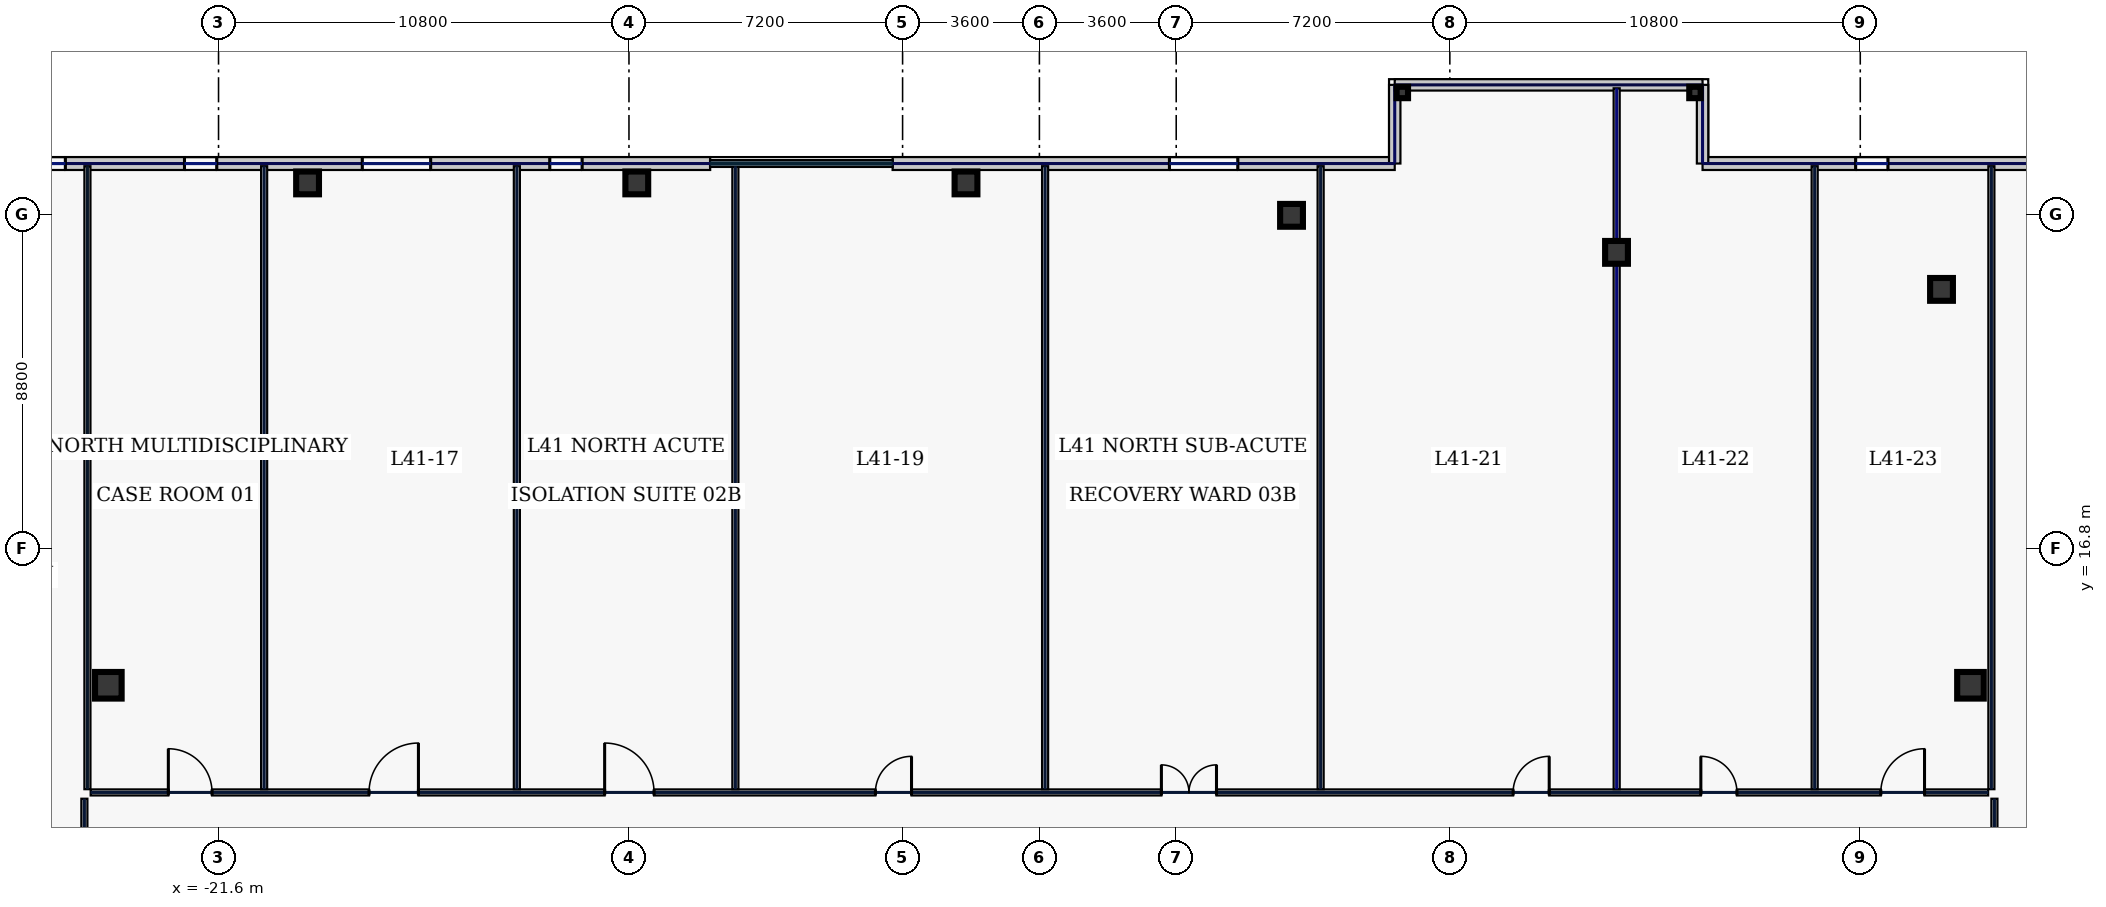
"""IFC4 building model, lengths in metres.
Left out: names, types, materials, properties, quantities, classifications, styles, units other than length and angle.
Written with IfcOpenShell. Run it as: python <this file> out.ifc"""

import sys

from ifc_helpers import new_model, si_unit, direction, frame, frame_2d, origin, origin_2d, place, context, subcontext, project, spatial, rectangle, hollow_rectangle, extrude, element, fill, save


model = new_model("IFC4")
c1 = context("Model", 3, precision=1e-05, world=origin(), true_north=direction((0.0, 1.0)))
c2 = subcontext(c1, "Body", "Model", "MODEL_VIEW")
j1 = project(units=[si_unit("LENGTHUNIT", "METRE"), si_unit("PLANEANGLEUNIT", "RADIAN")], contexts=[c1])
p1 = place(None, origin())
s1 = spatial("IfcSite", under=j1, at=p1, CompositionType="ELEMENT")
p2 = place(p1, origin())
s2 = spatial("IfcBuilding", under=s1, at=p2, CompositionType="ELEMENT")
p3 = place(p2, frame((0.0, 0.0, 180.2)))
s3 = spatial("IfcBuildingStorey", under=s2, at=p3, CompositionType="ELEMENT", Elevation=180.2)
for number, where, z_axis, x_axis in (
    (1, (-24.5, 13.2, 0.0), (0.0, 0.0, 1.0), (1.0, 0.0, 0.0)),
    (2, (24.5, 13.2, 0.0), (0.0, 0.0, 1.0), (1.0, 0.0, 0.0)),
):
    element("IfcColumn", number, at=place(p3, frame(where, z_axis=z_axis, x_axis=x_axis)), inside=s3, PredefinedType="COLUMN", context=c2, shape_type="SweptSolid", body=[
        extrude(hollow_rectangle(XDim=0.7, YDim=0.7, WallThickness=0.032, at=origin_2d()), origin(), (0.0, 0.0, 1.0), 3.74),
    ])
for number, where, z_axis, x_axis in (
    (3, (23.738, 23.618, 0.0), (0.0, 0.0, 1.0), (1.0, 0.0, 0.0)),
    (4, (15.186, 24.592, 0.0), (0.0, 0.0, 1.0), (1.0, 0.0, 0.0)),
    (5, (6.634, 25.567, 0.0), (0.0, 0.0, 1.0), (1.0, 0.0, 0.0)),
    (6, (-1.931, 26.42, 0.0), (0.0, 0.0, 1.0), (1.0, 0.0, 0.0)),
    (7, (-10.594, 26.42, 0.0), (0.0, 0.0, 1.0), (1.0, 0.0, 0.0)),
    (8, (-19.257, 26.42, 0.0), (0.0, 0.0, 1.0), (1.0, 0.0, 0.0)),
):
    element("IfcColumn", number, at=place(p3, frame(where, z_axis=z_axis, x_axis=x_axis)), inside=s3, PredefinedType="COLUMN", context=c2, shape_type="SweptSolid", body=[
        extrude(hollow_rectangle(XDim=0.6, YDim=0.6, WallThickness=0.028, at=origin_2d()), origin(), (0.0, 0.0, 1.0), 3.74),
    ])
for number, where, z_axis, x_axis in (
    (9, (9.55, 28.8, 0.0), (0.0, 0.0, 1.0), (1.0, 0.0, 0.0)),
    (10, (17.25, 28.8, 0.0), (0.0, 0.0, 1.0), (1.0, 0.0, 0.0)),
):
    element("IfcColumn", number, at=place(p3, frame(where, z_axis=z_axis, x_axis=x_axis)), inside=s3, PredefinedType="COLUMN", context=c2, shape_type="SweptSolid", body=[
        extrude(hollow_rectangle(XDim=0.3, YDim=0.3, WallThickness=0.016, at=origin_2d()), origin(), (0.0, 0.0, 1.0), 3.74),
    ])
p4 = place(p3, frame((33.4, 26.93, 0.0), z_axis=(0.0, 0.0, 1.0), x_axis=(-1.0, 0.0, 0.0)))
e11 = element("IfcWall", 11, at=p4, inside=s3, PredefinedType="STANDARD", context=c2, shape_type="SweptSolid", body=[
    extrude(rectangle(XDim=15.95, YDim=0.34, at=frame_2d((7.975, 0.0))), origin(), (0.0, 0.0, 1.0), 3.74),
])
p5 = place(p4, frame((11.071, 0.0, 0.7)))
e12 = element("IfcOpeningElement", 12, at=p5, cuts=e11, PredefinedType="OPENING", context=c2, shape_type="SweptSolid", body=[
    extrude(rectangle(XDim=0.85, YDim=1.85, at=frame_2d((0.425, 0.925))), frame((0.0, 0.18, 0.0), z_axis=(0.0, -1.0, 0.0), x_axis=(1.0, 0.0, 0.0)), (0.0, 0.0, 1.0), 0.36),
])
p6 = place(p4, frame((6.48, 0.0, 0.7)))
e13 = element("IfcOpeningElement", 13, at=p6, cuts=e11, PredefinedType="OPENING", context=c2, shape_type="SweptSolid", body=[
    extrude(rectangle(XDim=0.85, YDim=1.85, at=frame_2d((0.425, 0.925))), frame((0.0, 0.18, 0.0), z_axis=(0.0, -1.0, 0.0), x_axis=(1.0, 0.0, 0.0)), (0.0, 0.0, 1.0), 0.36),
])
p7 = place(p4, frame((2.591, 0.0, 0.7)))
e14 = element("IfcOpeningElement", 14, at=p7, cuts=e11, PredefinedType="OPENING", context=c2, shape_type="SweptSolid", body=[
    extrude(rectangle(XDim=1.8, YDim=2.2, at=frame_2d((0.9, 1.1))), frame((0.0, 0.18, 0.0), z_axis=(0.0, -1.0, 0.0), x_axis=(1.0, 0.0, 0.0)), (0.0, 0.0, 1.0), 0.36),
])
p8 = place(p3, frame((9.35, 26.93, 0.0), z_axis=(0.0, 0.0, 1.0), x_axis=(-1.0, 0.0, 0.0)))
e15 = element("IfcWall", 15, at=p8, inside=s3, PredefinedType="STANDARD", context=c2, shape_type="SweptSolid", body=[
    extrude(rectangle(XDim=13.213, YDim=0.34, at=frame_2d((6.606, 0.0))), origin(), (0.0, 0.0, 1.0), 3.74),
])
p9 = place(p8, frame((4.128, 0.0, 0.7)))
e16 = element("IfcOpeningElement", 16, at=p9, cuts=e15, PredefinedType="OPENING", context=c2, shape_type="SweptSolid", body=[
    extrude(rectangle(XDim=1.8, YDim=2.2, at=frame_2d((0.9, 1.1))), frame((0.0, 0.18, 0.0), z_axis=(0.0, -1.0, 0.0), x_axis=(1.0, 0.0, 0.0)), (0.0, 0.0, 1.0), 0.36),
])
p10 = place(p3, frame((-8.663, 26.93, 0.0), z_axis=(0.0, 0.0, 1.0), x_axis=(-1.0, 0.0, 0.0)))
e17 = element("IfcWall", 17, at=p10, inside=s3, PredefinedType="STANDARD", context=c2, shape_type="SweptSolid", body=[
    extrude(rectangle(XDim=19.937, YDim=0.34, at=frame_2d((9.969, 0.0))), origin(), (0.0, 0.0, 1.0), 3.74),
])
p11 = place(p10, frame((16.968, 0.0, 0.7)))
e18 = element("IfcOpeningElement", 18, at=p11, cuts=e17, PredefinedType="OPENING", context=c2, shape_type="SweptSolid", body=[
    extrude(rectangle(XDim=0.85, YDim=1.85, at=frame_2d((0.425, 0.925))), frame((0.0, 0.18, 0.0), z_axis=(0.0, -1.0, 0.0), x_axis=(1.0, 0.0, 0.0)), (0.0, 0.0, 1.0), 0.36),
])
p12 = place(p10, frame((12.983, 0.0, 0.7)))
e19 = element("IfcOpeningElement", 19, at=p12, cuts=e17, PredefinedType="OPENING", context=c2, shape_type="SweptSolid", body=[
    extrude(rectangle(XDim=0.85, YDim=1.85, at=frame_2d((0.425, 0.925))), frame((0.0, 0.18, 0.0), z_axis=(0.0, -1.0, 0.0), x_axis=(1.0, 0.0, 0.0)), (0.0, 0.0, 1.0), 0.36),
])
p13 = place(p10, frame((7.355, 0.0, 0.7)))
e20 = element("IfcOpeningElement", 20, at=p13, cuts=e17, PredefinedType="OPENING", context=c2, shape_type="SweptSolid", body=[
    extrude(rectangle(XDim=1.8, YDim=2.2, at=frame_2d((0.9, 1.1))), frame((0.0, 0.18, 0.0), z_axis=(0.0, -1.0, 0.0), x_axis=(1.0, 0.0, 0.0)), (0.0, 0.0, 1.0), 0.36),
])
p14 = place(p10, frame((3.371, 0.0, 0.7)))
e21 = element("IfcOpeningElement", 21, at=p14, cuts=e17, PredefinedType="OPENING", context=c2, shape_type="SweptSolid", body=[
    extrude(rectangle(XDim=0.85, YDim=1.85, at=frame_2d((0.425, 0.925))), frame((0.0, 0.18, 0.0), z_axis=(0.0, -1.0, 0.0), x_axis=(1.0, 0.0, 0.0)), (0.0, 0.0, 1.0), 0.36),
])
for number, where, z_axis, x_axis in (
    (22, (9.35, 26.93, 0.0), (0.0, 0.0, 1.0), (0.0, 1.0, 0.0)),
    (23, (17.45, 26.93, 0.0), (0.0, 0.0, 1.0), (0.0, 1.0, 0.0)),
):
    element("IfcWall", number, at=place(p3, frame(where, z_axis=z_axis, x_axis=x_axis)), inside=s3, PredefinedType="STANDARD", context=c2, shape_type="SweptSolid", body=[
        extrude(rectangle(XDim=2.07, YDim=0.3, at=frame_2d((1.035, 0.0))), origin(), (0.0, 0.0, 1.0), 1.535),
    ])
p15 = place(p3, frame((9.35, 29.0, 0.0), z_axis=(0.0, 0.0, 1.0), x_axis=(1.0, 0.0, 0.0)))
e24 = element("IfcWall", 24, at=p15, inside=s3, PredefinedType="STANDARD", context=c2, shape_type="SweptSolid", body=[
    extrude(rectangle(XDim=8.1, YDim=0.3, at=frame_2d((4.05, 0.0))), origin(), (0.0, 0.0, 1.0), 2.135),
])
p16 = place(p3, frame((-25.13, 7.235, 0.0), z_axis=(0.0, 0.0, 1.0), x_axis=(0.0, 1.0, 0.0)))
e25 = element("IfcWall", 25, at=p16, inside=s3, PredefinedType="PARTITIONING", context=c2, shape_type="SweptSolid", body=[
    extrude(rectangle(XDim=2.98, YDim=0.16, at=frame_2d((1.49, 0.0))), origin(), (0.0, 0.0, 1.0), 3.74),
])
p17 = place(p16, frame((1.1, 0.0, 0.0)))
e26 = element("IfcOpeningElement", 26, at=p17, cuts=e25, PredefinedType="OPENING", context=c2, shape_type="SweptSolid", body=[
    extrude(rectangle(XDim=0.95, YDim=2.2, at=frame_2d((0.475, 1.1))), frame((0.0, 0.09, 0.0), z_axis=(0.0, -1.0, 0.0), x_axis=(1.0, 0.0, 0.0)), (0.0, 0.0, 1.0), 0.18),
])
p18 = place(p3, frame((-24.965, 10.38, 0.0), z_axis=(0.0, 0.0, 1.0), x_axis=(1.0, 0.0, 0.0)))
e27 = element("IfcWall", 27, at=p18, inside=s3, PredefinedType="PARTITIONING", context=c2, shape_type="SweptSolid", body=[
    extrude(rectangle(XDim=49.93, YDim=0.16, at=frame_2d((24.965, 0.0))), origin(), (0.0, 0.0, 1.0), 3.74),
])
p19 = place(p18, frame((2.044, 0.0, 0.0)))
e28 = element("IfcOpeningElement", 28, at=p19, cuts=e27, PredefinedType="OPENING", context=c2, shape_type="SweptSolid", body=[
    extrude(rectangle(XDim=1.15, YDim=2.2, at=frame_2d((0.575, 1.1))), frame((0.0, 0.09, 0.0), z_axis=(0.0, -1.0, 0.0), x_axis=(1.0, 0.0, 0.0)), (0.0, 0.0, 1.0), 0.18),
])
p20 = place(p18, frame((7.325, 0.0, 0.0)))
e29 = element("IfcOpeningElement", 29, at=p20, cuts=e27, PredefinedType="OPENING", context=c2, shape_type="SweptSolid", body=[
    extrude(rectangle(XDim=1.3, YDim=2.2, at=frame_2d((0.65, 1.1))), frame((0.0, 0.09, 0.0), z_axis=(0.0, -1.0, 0.0), x_axis=(1.0, 0.0, 0.0)), (0.0, 0.0, 1.0), 0.18),
])
p21 = place(p18, frame((13.525, 0.0, 0.0)))
e30 = element("IfcOpeningElement", 30, at=p21, cuts=e27, PredefinedType="OPENING", context=c2, shape_type="SweptSolid", body=[
    extrude(rectangle(XDim=1.3, YDim=2.2, at=frame_2d((0.65, 1.1))), frame((0.0, 0.09, 0.0), z_axis=(0.0, -1.0, 0.0), x_axis=(1.0, 0.0, 0.0)), (0.0, 0.0, 1.0), 0.18),
])
p22 = place(p18, frame((20.65, 0.0, 0.0)))
e31 = element("IfcOpeningElement", 31, at=p22, cuts=e27, PredefinedType="OPENING", context=c2, shape_type="SweptSolid", body=[
    extrude(rectangle(XDim=0.95, YDim=2.2, at=frame_2d((0.475, 1.1))), frame((0.0, 0.09, 0.0), z_axis=(0.0, -1.0, 0.0), x_axis=(1.0, 0.0, 0.0)), (0.0, 0.0, 1.0), 0.18),
])
p23 = place(p18, frame((28.175, 0.0, 0.0)))
e32 = element("IfcOpeningElement", 32, at=p23, cuts=e27, PredefinedType="OPENING", context=c2, shape_type="SweptSolid", body=[
    extrude(rectangle(XDim=1.45, YDim=2.2, at=frame_2d((0.725, 1.1))), frame((0.0, 0.09, 0.0), z_axis=(0.0, -1.0, 0.0), x_axis=(1.0, 0.0, 0.0)), (0.0, 0.0, 1.0), 0.18),
])
p24 = place(p18, frame((37.43, 0.0, 0.0)))
e33 = element("IfcOpeningElement", 33, at=p24, cuts=e27, PredefinedType="OPENING", context=c2, shape_type="SweptSolid", body=[
    extrude(rectangle(XDim=0.95, YDim=2.2, at=frame_2d((0.475, 1.1))), frame((0.0, 0.09, 0.0), z_axis=(0.0, -1.0, 0.0), x_axis=(1.0, 0.0, 0.0)), (0.0, 0.0, 1.0), 0.18),
])
p25 = place(p18, frame((42.37, 0.0, 0.0)))
e34 = element("IfcOpeningElement", 34, at=p25, cuts=e27, PredefinedType="OPENING", context=c2, shape_type="SweptSolid", body=[
    extrude(rectangle(XDim=0.95, YDim=2.2, at=frame_2d((0.475, 1.1))), frame((0.0, 0.09, 0.0), z_axis=(0.0, -1.0, 0.0), x_axis=(1.0, 0.0, 0.0)), (0.0, 0.0, 1.0), 0.18),
])
p26 = place(p18, frame((47.106, 0.0, 0.0)))
e35 = element("IfcOpeningElement", 35, at=p26, cuts=e27, PredefinedType="OPENING", context=c2, shape_type="SweptSolid", body=[
    extrude(rectangle(XDim=1.15, YDim=2.2, at=frame_2d((0.575, 1.1))), frame((0.0, 0.09, 0.0), z_axis=(0.0, -1.0, 0.0), x_axis=(1.0, 0.0, 0.0)), (0.0, 0.0, 1.0), 0.18),
])
p27 = place(p3, frame((25.13, 10.215, 0.0), z_axis=(0.0, 0.0, 1.0), x_axis=(0.0, -1.0, 0.0)))
e36 = element("IfcWall", 36, at=p27, inside=s3, PredefinedType="PARTITIONING", context=c2, shape_type="SweptSolid", body=[
    extrude(rectangle(XDim=2.98, YDim=0.16, at=frame_2d((1.49, 0.0))), origin(), (0.0, 0.0, 1.0), 3.74),
])
p28 = place(p27, frame((1.1, 0.0, 0.0)))
e37 = element("IfcOpeningElement", 37, at=p28, cuts=e36, PredefinedType="OPENING", context=c2, shape_type="SweptSolid", body=[
    extrude(rectangle(XDim=0.95, YDim=2.2, at=frame_2d((0.475, 1.1))), frame((0.0, 0.09, 0.0), z_axis=(0.0, -1.0, 0.0), x_axis=(1.0, 0.0, 0.0)), (0.0, 0.0, 1.0), 0.18),
])
p29 = place(p3, frame((-25.05, 10.465, 0.0), z_axis=(0.0, 0.0, 1.0), x_axis=(0.0, 1.0, 0.0)))
e38 = element("IfcWall", 38, at=p29, inside=s3, PredefinedType="PARTITIONING", context=c2, shape_type="SweptSolid", body=[
    extrude(rectangle(XDim=16.395, YDim=0.16, at=frame_2d((8.198, 0.0))), origin(), (0.0, 0.0, 1.0), 3.285),
])
for number, where, z_axis, x_axis in (
    (39, (25.05, 10.465, 0.0), (0.0, 0.0, 1.0), (0.0, 1.0, 0.0)),
    (40, (-20.4, 10.465, 0.0), (0.0, 0.0, 1.0), (0.0, 1.0, 0.0)),
    (41, (-8.0, 10.465, 0.0), (0.0, 0.0, 1.0), (0.0, 1.0, 0.0)),
    (42, (7.4, 10.465, 0.0), (0.0, 0.0, 1.0), (0.0, 1.0, 0.0)),
    (43, (20.4, 10.465, 0.0), (0.0, 0.0, 1.0), (0.0, 1.0, 0.0)),
    (44, (-13.75, 10.465, 0.0), (0.0, 0.0, 1.0), (0.0, 1.0, 0.0)),
    (45, (0.15, 10.465, 0.0), (0.0, 0.0, 1.0), (0.0, 1.0, 0.0)),
):
    element("IfcWall", number, at=place(p3, frame(where, z_axis=z_axis, x_axis=x_axis)), inside=s3, PredefinedType="PARTITIONING", context=c2, shape_type="SweptSolid", body=[
        extrude(rectangle(XDim=16.395, YDim=0.16, at=frame_2d((8.198, 0.0))), origin(), (0.0, 0.0, 1.0), 3.74),
    ])
p30 = place(p3, frame((15.19, 10.465, 0.0), z_axis=(0.0, 0.0, 1.0), x_axis=(0.0, 1.0, 0.0)))
e46 = element("IfcWall", 46, at=p30, inside=s3, PredefinedType="PARTITIONING", context=c2, shape_type="SweptSolid", body=[
    extrude(rectangle(XDim=18.445, YDim=0.16, at=frame_2d((9.222, 0.0))), origin(), (0.0, 0.0, 1.0), 1.535),
])
p31 = place(p5, origin())
e47 = element("IfcWindow", 47, at=p31, inside=s3, PartitioningType="SINGLE_PANEL", PredefinedType="WINDOW", context=c2, shape_type="SweptSolid", body=[
    extrude(rectangle(XDim=0.85, YDim=1.85, at=frame_2d((0.425, 0.925))), frame((0.0, 0.03, 0.0), z_axis=(0.0, -1.0, 0.0), x_axis=(1.0, 0.0, 0.0)), (0.0, 0.0, 1.0), 0.06),
])
fill(e12, e47)
p32 = place(p9, origin())
e48 = element("IfcWindow", 48, at=p32, inside=s3, PartitioningType="SINGLE_PANEL", PredefinedType="WINDOW", context=c2, shape_type="SweptSolid", body=[
    extrude(rectangle(XDim=1.8, YDim=2.2, at=frame_2d((0.9, 1.1))), frame((0.0, 0.03, 0.0), z_axis=(0.0, -1.0, 0.0), x_axis=(1.0, 0.0, 0.0)), (0.0, 0.0, 1.0), 0.06),
])
fill(e16, e48)
p33 = place(p11, origin())
e49 = element("IfcWindow", 49, at=p33, inside=s3, PartitioningType="SINGLE_PANEL", PredefinedType="WINDOW", context=c2, shape_type="SweptSolid", body=[
    extrude(rectangle(XDim=0.85, YDim=1.85, at=frame_2d((0.425, 0.925))), frame((0.0, 0.03, 0.0), z_axis=(0.0, -1.0, 0.0), x_axis=(1.0, 0.0, 0.0)), (0.0, 0.0, 1.0), 0.06),
])
fill(e18, e49)
p34 = place(p12, origin())
e50 = element("IfcWindow", 50, at=p34, inside=s3, PartitioningType="SINGLE_PANEL", PredefinedType="WINDOW", context=c2, shape_type="SweptSolid", body=[
    extrude(rectangle(XDim=0.85, YDim=1.85, at=frame_2d((0.425, 0.925))), frame((0.0, 0.03, 0.0), z_axis=(0.0, -1.0, 0.0), x_axis=(1.0, 0.0, 0.0)), (0.0, 0.0, 1.0), 0.06),
])
fill(e19, e50)
p35 = place(p13, origin())
e51 = element("IfcWindow", 51, at=p35, inside=s3, PartitioningType="SINGLE_PANEL", PredefinedType="WINDOW", context=c2, shape_type="SweptSolid", body=[
    extrude(rectangle(XDim=1.8, YDim=2.2, at=frame_2d((0.9, 1.1))), frame((0.0, 0.03, 0.0), z_axis=(0.0, -1.0, 0.0), x_axis=(1.0, 0.0, 0.0)), (0.0, 0.0, 1.0), 0.06),
])
fill(e20, e51)
p36 = place(p14, origin())
e52 = element("IfcWindow", 52, at=p36, inside=s3, PartitioningType="SINGLE_PANEL", PredefinedType="WINDOW", context=c2, shape_type="SweptSolid", body=[
    extrude(rectangle(XDim=0.85, YDim=1.85, at=frame_2d((0.425, 0.925))), frame((0.0, 0.03, 0.0), z_axis=(0.0, -1.0, 0.0), x_axis=(1.0, 0.0, 0.0)), (0.0, 0.0, 1.0), 0.06),
])
fill(e21, e52)
p37 = place(p19, origin())
e53 = element("IfcDoor", 53, at=p37, inside=s3, OperationType="SINGLE_SWING_LEFT", PredefinedType="DOOR", context=c2, shape_type="SweptSolid", body=[
    extrude(rectangle(XDim=1.15, YDim=2.2, at=frame_2d((0.575, 1.1))), frame((0.0, 0.025, 0.0), z_axis=(0.0, -1.0, 0.0), x_axis=(1.0, 0.0, 0.0)), (0.0, 0.0, 1.0), 0.05),
])
fill(e28, e53)
p38 = place(p20, origin())
e54 = element("IfcDoor", 54, at=p38, inside=s3, OperationType="SINGLE_SWING_RIGHT", PredefinedType="DOOR", context=c2, shape_type="SweptSolid", body=[
    extrude(rectangle(XDim=1.3, YDim=2.2, at=frame_2d((0.65, 1.1))), frame((0.0, 0.025, 0.0), z_axis=(0.0, -1.0, 0.0), x_axis=(1.0, 0.0, 0.0)), (0.0, 0.0, 1.0), 0.05),
])
fill(e29, e54)
p39 = place(p21, origin())
e55 = element("IfcDoor", 55, at=p39, inside=s3, OperationType="SINGLE_SWING_LEFT", PredefinedType="DOOR", context=c2, shape_type="SweptSolid", body=[
    extrude(rectangle(XDim=1.3, YDim=2.2, at=frame_2d((0.65, 1.1))), frame((0.0, 0.025, 0.0), z_axis=(0.0, -1.0, 0.0), x_axis=(1.0, 0.0, 0.0)), (0.0, 0.0, 1.0), 0.05),
])
fill(e30, e55)
p40 = place(p22, origin())
e56 = element("IfcDoor", 56, at=p40, inside=s3, OperationType="SINGLE_SWING_RIGHT", PredefinedType="DOOR", context=c2, shape_type="SweptSolid", body=[
    extrude(rectangle(XDim=0.95, YDim=2.2, at=frame_2d((0.475, 1.1))), frame((0.0, 0.025, 0.0), z_axis=(0.0, -1.0, 0.0), x_axis=(1.0, 0.0, 0.0)), (0.0, 0.0, 1.0), 0.05),
])
fill(e31, e56)
p41 = place(p23, origin())
e57 = element("IfcDoor", 57, at=p41, inside=s3, OperationType="DOUBLE_SWING_LEFT", PredefinedType="DOOR", context=c2, shape_type="SweptSolid", body=[
    extrude(rectangle(XDim=1.45, YDim=2.2, at=frame_2d((0.725, 1.1))), frame((0.0, 0.025, 0.0), z_axis=(0.0, -1.0, 0.0), x_axis=(1.0, 0.0, 0.0)), (0.0, 0.0, 1.0), 0.05),
])
fill(e32, e57)
p42 = place(p24, origin())
e58 = element("IfcDoor", 58, at=p42, inside=s3, OperationType="SINGLE_SWING_RIGHT", PredefinedType="DOOR", context=c2, shape_type="SweptSolid", body=[
    extrude(rectangle(XDim=0.95, YDim=2.2, at=frame_2d((0.475, 1.1))), frame((0.0, 0.025, 0.0), z_axis=(0.0, -1.0, 0.0), x_axis=(1.0, 0.0, 0.0)), (0.0, 0.0, 1.0), 0.05),
])
fill(e33, e58)
p43 = place(p25, origin())
e59 = element("IfcDoor", 59, at=p43, inside=s3, OperationType="SINGLE_SWING_LEFT", PredefinedType="DOOR", context=c2, shape_type="SweptSolid", body=[
    extrude(rectangle(XDim=0.95, YDim=2.2, at=frame_2d((0.475, 1.1))), frame((0.0, 0.025, 0.0), z_axis=(0.0, -1.0, 0.0), x_axis=(1.0, 0.0, 0.0)), (0.0, 0.0, 1.0), 0.05),
])
fill(e34, e59)
p44 = place(p26, origin())
e60 = element("IfcDoor", 60, at=p44, inside=s3, OperationType="SINGLE_SWING_RIGHT", PredefinedType="DOOR", context=c2, shape_type="SweptSolid", body=[
    extrude(rectangle(XDim=1.15, YDim=2.2, at=frame_2d((0.575, 1.1))), frame((0.0, 0.025, 0.0), z_axis=(0.0, -1.0, 0.0), x_axis=(1.0, 0.0, 0.0)), (0.0, 0.0, 1.0), 0.05),
])
fill(e35, e60)
save(model, sys.argv[1])
